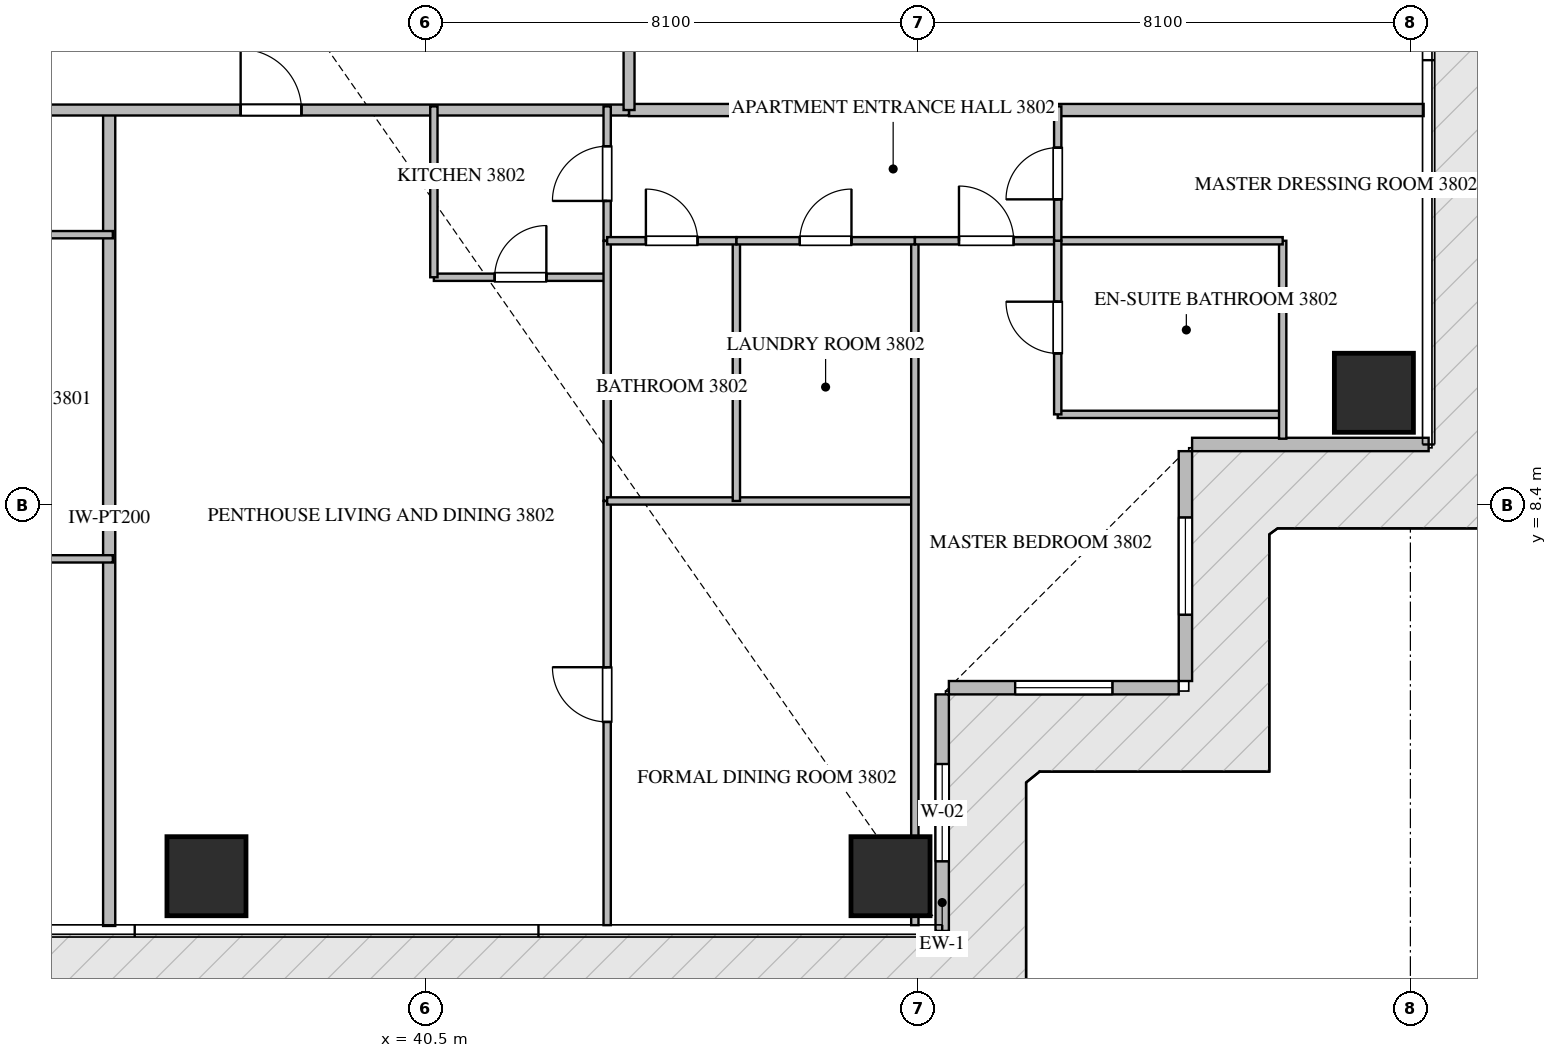
"""IFC4 building model, lengths in metres.
Left out: names, types, materials, properties, quantities, classifications, styles, units other than length and angle.
Written with IfcOpenShell. Run it as: python <this file> out.ifc"""

import sys

from ifc_helpers import new_model, si_unit, direction, frame, frame_2d, origin, origin_2d, place, context, subcontext, project, spatial, rectangle, extrude, source, transform, mapped, element, fill, save


model = new_model("IFC4")
c1 = context("Model", 3, precision=1e-05, world=origin(), true_north=direction((0.0, 1.0)))
c2 = subcontext(c1, "Body", "Model", "MODEL_VIEW")
j1 = project(units=[si_unit("LENGTHUNIT", "METRE"), si_unit("PLANEANGLEUNIT", "RADIAN")], contexts=[c1])
p1 = place(None, origin())
s1 = spatial("IfcSite", under=j1, at=p1, CompositionType="ELEMENT")
p2 = place(p1, origin())
s2 = spatial("IfcBuilding", under=s1, at=p2, CompositionType="ELEMENT")
p3 = place(p2, frame((0.0, 0.0, 153.9)))
s3 = spatial("IfcBuildingStorey", under=s2, at=p3, CompositionType="ELEMENT", Elevation=153.9)
m1 = source(origin(), c2, "Body", "SweptSolid", [
    extrude(rectangle(XDim=1.3, YDim=1.3, at=origin_2d()), origin(), (0.0, 0.0, 1.0), 3.75),
])
for number, where, z_axis, x_axis in (
    (1, (36.9, 2.3, -0.26), (0.0, 0.0, 1.0), (1.0, 0.0, 0.0)),
    (2, (48.15, 2.3, -0.26), (0.0, 0.0, 1.0), (1.0, 0.0, 0.0)),
    (3, (56.1, 10.25, -0.26), (0.0, 0.0, 1.0), (1.0, 0.0, 0.0)),
):
    element("IfcColumn", number, at=place(p3, frame(where, z_axis=z_axis, x_axis=x_axis)), inside=s3, PredefinedType="COLUMN", context=c2, shape_type="MappedRepresentation", body=[
        mapped(m1, transform((0.0, 0.0, 0.0), scale=1.0)),
    ])
p4 = place(p3, frame((49.0, 1.4, 0.0), z_axis=(0.0, 0.0, 1.0), x_axis=(0.0, 1.0, 0.0)))
e4 = element("IfcWall", 4, at=p4, inside=s3, PredefinedType="ELEMENTEDWALL", context=c2, shape_type="SweptSolid", body=[
    extrude(rectangle(XDim=3.89, YDim=0.22, at=frame_2d((1.945, 0.0))), origin(), (0.0, 0.0, 1.0), 3.475),
])
p5 = place(p4, frame((1.145, 0.0, 0.65)))
e5 = element("IfcOpeningElement", 5, at=p5, cuts=e4, PredefinedType="OPENING", context=c2, shape_type="SweptSolid", body=[
    extrude(rectangle(XDim=1.6, YDim=2.1, at=frame_2d((0.8, 1.05))), frame((0.0, 0.12, 0.0), z_axis=(0.0, -1.0, 0.0), x_axis=(1.0, 0.0, 0.0)), (0.0, 0.0, 1.0), 0.24),
])
p6 = place(p3, frame((49.11, 5.4, 0.0), z_axis=(0.0, 0.0, 1.0), x_axis=(1.0, 0.0, 0.0)))
e6 = element("IfcWall", 6, at=p6, inside=s3, PredefinedType="ELEMENTEDWALL", context=c2, shape_type="SweptSolid", body=[
    extrude(rectangle(XDim=3.78, YDim=0.22, at=frame_2d((1.89, 0.0))), origin(), (0.0, 0.0, 1.0), 3.475),
])
p7 = place(p6, frame((1.09, 0.0, 0.65)))
e7 = element("IfcOpeningElement", 7, at=p7, cuts=e6, PredefinedType="OPENING", context=c2, shape_type="SweptSolid", body=[
    extrude(rectangle(XDim=1.6, YDim=2.1, at=frame_2d((0.8, 1.05))), frame((0.0, 0.12, 0.0), z_axis=(0.0, -1.0, 0.0), x_axis=(1.0, 0.0, 0.0)), (0.0, 0.0, 1.0), 0.24),
])
p8 = place(p3, frame((53.0, 5.51, 0.0), z_axis=(0.0, 0.0, 1.0), x_axis=(0.0, 1.0, 0.0)))
e8 = element("IfcWall", 8, at=p8, inside=s3, PredefinedType="ELEMENTEDWALL", context=c2, shape_type="SweptSolid", body=[
    extrude(rectangle(XDim=3.78, YDim=0.22, at=frame_2d((1.89, 0.0))), origin(), (0.0, 0.0, 1.0), 3.475),
])
p9 = place(p8, frame((1.09, 0.0, 0.65)))
e9 = element("IfcOpeningElement", 9, at=p9, cuts=e8, PredefinedType="OPENING", context=c2, shape_type="SweptSolid", body=[
    extrude(rectangle(XDim=1.6, YDim=2.1, at=frame_2d((0.8, 1.05))), frame((0.0, 0.12, 0.0), z_axis=(0.0, -1.0, 0.0), x_axis=(1.0, 0.0, 0.0)), (0.0, 0.0, 1.0), 0.24),
])
p10 = place(p3, frame((53.11, 9.4, 0.0), z_axis=(0.0, 0.0, 1.0), x_axis=(1.0, 0.0, 0.0)))
e10 = element("IfcWall", 10, at=p10, inside=s3, PredefinedType="ELEMENTEDWALL", context=c2, shape_type="SweptSolid", body=[
    extrude(rectangle(XDim=3.89, YDim=0.22, at=frame_2d((1.945, 0.0))), origin(), (0.0, 0.0, 1.0), 3.475),
])
p11 = place(p3, frame((35.3, 1.482, 0.0), z_axis=(0.0, 0.0, 1.0), x_axis=(0.0, 1.0, 0.0)))
e11 = element("IfcWall", 11, at=p11, inside=s3, PredefinedType="PARTITIONING", context=c2, shape_type="SweptSolid", body=[
    extrude(rectangle(XDim=13.418, YDim=0.2, at=frame_2d((6.709, 0.0))), origin(), (0.0, 0.0, 1.0), 3.49),
])
p12 = place(p3, frame((43.85, 14.9, 0.0), z_axis=(0.0, 0.0, 1.0), x_axis=(1.0, 0.0, 0.0)))
e12 = element("IfcWall", 12, at=p12, inside=s3, PredefinedType="PARTITIONING", context=c2, shape_type="SweptSolid", body=[
    extrude(rectangle(XDim=13.068, YDim=0.2, at=frame_2d((6.534, 0.0))), origin(), (0.0, 0.0, 1.0), 3.49),
])
p13 = place(p3, frame((20.952, 14.9, 0.0), z_axis=(0.0, 0.0, 1.0), x_axis=(1.0, 0.0, 0.0)))
e13 = element("IfcWall", 13, at=p13, inside=s3, PredefinedType="PARTITIONING", context=c2, shape_type="SweptSolid", body=[
    extrude(rectangle(XDim=22.896, YDim=0.18, at=frame_2d((11.448, 0.0))), origin(), (0.0, 0.0, 1.0), 3.49),
])
p14 = place(p13, frame((5.934, 0.0, 0.0)))
e14 = element("IfcOpeningElement", 14, at=p14, cuts=e13, PredefinedType="OPENING", context=c2, shape_type="SweptSolid", body=[
    extrude(rectangle(XDim=1.0, YDim=2.15, at=frame_2d((0.5, 1.075))), frame((0.0, 0.1, 0.0), z_axis=(0.0, -1.0, 0.0), x_axis=(1.0, 0.0, 0.0)), (0.0, 0.0, 1.0), 0.2),
])
p15 = place(p13, frame((16.51, 0.0, 0.0)))
e15 = element("IfcOpeningElement", 15, at=p15, cuts=e13, PredefinedType="OPENING", context=c2, shape_type="SweptSolid", body=[
    extrude(rectangle(XDim=1.0, YDim=2.15, at=frame_2d((0.5, 1.075))), frame((0.0, 0.1, 0.0), z_axis=(0.0, -1.0, 0.0), x_axis=(1.0, 0.0, 0.0)), (0.0, 0.0, 1.0), 0.2),
])
p16 = place(p3, frame((43.85, 14.9, 0.0), z_axis=(0.0, 0.0, 1.0), x_axis=(0.0, 1.0, 0.0)))
e16 = element("IfcWall", 16, at=p16, inside=s3, PredefinedType="PARTITIONING", context=c2, shape_type="SweptSolid", body=[
    extrude(rectangle(XDim=18.7, YDim=0.18, at=frame_2d((9.35, 0.0))), origin(), (0.0, 0.0, 1.0), 3.49),
])
p17 = place(p16, frame((1.805, 0.0, 0.0)))
e17 = element("IfcOpeningElement", 17, at=p17, cuts=e16, PredefinedType="OPENING", context=c2, shape_type="SweptSolid", body=[
    extrude(rectangle(XDim=1.0, YDim=2.15, at=frame_2d((0.5, 1.075))), frame((0.0, 0.1, 0.0), z_axis=(0.0, -1.0, 0.0), x_axis=(1.0, 0.0, 0.0)), (0.0, 0.0, 1.0), 0.2),
])
for number, where, z_axis, x_axis in (
    (18, (30.27, 7.519, 0.0), (0.0, 0.0, 1.0), (1.0, 0.0, 0.0)),
    (19, (30.27, 12.85, 0.0), (0.0, 0.0, 1.0), (1.0, 0.0, 0.0)),
):
    element("IfcWall", number, at=place(p3, frame(where, z_axis=z_axis, x_axis=x_axis)), inside=s3, PredefinedType="PARTITIONING", context=c2, shape_type="SweptSolid", body=[
        extrude(rectangle(XDim=5.09, YDim=0.12, at=frame_2d((2.545, 0.0))), origin(), (0.0, 0.0, 1.0), 3.49),
    ])
p18 = place(p3, frame((40.64, 12.15, 0.0), z_axis=(0.0, 0.0, 1.0), x_axis=(1.0, 0.0, 0.0)))
e20 = element("IfcWall", 20, at=p18, inside=s3, PredefinedType="PARTITIONING", context=c2, shape_type="SweptSolid", body=[
    extrude(rectangle(XDim=2.85, YDim=0.12, at=frame_2d((1.425, 0.0))), origin(), (0.0, 0.0, 1.0), 3.49),
])
p19 = place(p18, frame((1.0, 0.0, 0.0)))
e21 = element("IfcOpeningElement", 21, at=p19, cuts=e20, PredefinedType="OPENING", context=c2, shape_type="SweptSolid", body=[
    extrude(rectangle(XDim=0.85, YDim=2.1, at=frame_2d((0.425, 1.05))), frame((0.0, 0.07, 0.0), z_axis=(0.0, -1.0, 0.0), x_axis=(1.0, 0.0, 0.0)), (0.0, 0.0, 1.0), 0.14),
])
p20 = place(p3, frame((40.64, 12.15, 0.0), z_axis=(0.0, 0.0, 1.0), x_axis=(0.0, 1.0, 0.0)))
e22 = element("IfcWall", 22, at=p20, inside=s3, PredefinedType="PARTITIONING", context=c2, shape_type="SweptSolid", body=[
    extrude(rectangle(XDim=2.81, YDim=0.12, at=frame_2d((1.405, 0.0))), origin(), (0.0, 0.0, 1.0), 3.49),
])
p21 = place(p3, frame((43.49, 12.75, 0.0), z_axis=(0.0, 0.0, 1.0), x_axis=(0.0, 1.0, 0.0)))
e23 = element("IfcWall", 23, at=p21, inside=s3, PredefinedType="PARTITIONING", context=c2, shape_type="SweptSolid", body=[
    extrude(rectangle(XDim=2.21, YDim=0.12, at=frame_2d((1.105, 0.0))), origin(), (0.0, 0.0, 1.0), 3.49),
])
p22 = place(p21, frame((0.655, 0.0, 0.0)))
e24 = element("IfcOpeningElement", 24, at=p22, cuts=e23, PredefinedType="OPENING", context=c2, shape_type="SweptSolid", body=[
    extrude(rectangle(XDim=0.9, YDim=2.1, at=frame_2d((0.45, 1.05))), frame((0.0, 0.07, 0.0), z_axis=(0.0, -1.0, 0.0), x_axis=(1.0, 0.0, 0.0)), (0.0, 0.0, 1.0), 0.14),
])
p23 = place(p3, frame((43.49, 1.495, 0.0), z_axis=(0.0, 0.0, 1.0), x_axis=(0.0, 1.0, 0.0)))
e25 = element("IfcWall", 25, at=p23, inside=s3, PredefinedType="PARTITIONING", context=c2, shape_type="SweptSolid", body=[
    extrude(rectangle(XDim=6.976, YDim=0.12, at=frame_2d((3.488, 0.0))), origin(), (0.0, 0.0, 1.0), 3.49),
])
p24 = place(p23, frame((3.342, 0.0, 0.0)))
e26 = element("IfcOpeningElement", 26, at=p24, cuts=e25, PredefinedType="OPENING", context=c2, shape_type="SweptSolid", body=[
    extrude(rectangle(XDim=0.9, YDim=2.1, at=frame_2d((0.45, 1.05))), frame((0.0, 0.07, 0.0), z_axis=(0.0, -1.0, 0.0), x_axis=(1.0, 0.0, 0.0)), (0.0, 0.0, 1.0), 0.14),
])
p25 = place(p3, frame((43.49, 8.473, 0.0), z_axis=(0.0, 0.0, 1.0), x_axis=(0.0, 1.0, 0.0)))
e27 = element("IfcWall", 27, at=p25, inside=s3, PredefinedType="PARTITIONING", context=c2, shape_type="SweptSolid", body=[
    extrude(rectangle(XDim=4.275, YDim=0.12, at=frame_2d((2.138, 0.0))), origin(), (0.0, 0.0, 1.0), 3.49),
])
p26 = place(p3, frame((43.49, 8.471, 0.0), z_axis=(0.0, 0.0, 1.0), x_axis=(1.0, 0.0, 0.0)))
e28 = element("IfcWall", 28, at=p26, inside=s3, PredefinedType="PARTITIONING", context=c2, shape_type="SweptSolid", body=[
    extrude(rectangle(XDim=5.06, YDim=0.12, at=frame_2d((2.53, 0.0))), origin(), (0.0, 0.0, 1.0), 3.49),
])
p27 = place(p3, frame((48.55, 1.495, 0.0), z_axis=(0.0, 0.0, 1.0), x_axis=(0.0, 1.0, 0.0)))
e29 = element("IfcWall", 29, at=p27, inside=s3, PredefinedType="PARTITIONING", context=c2, shape_type="SweptSolid", body=[
    extrude(rectangle(XDim=11.255, YDim=0.12, at=frame_2d((5.627, 0.0))), origin(), (0.0, 0.0, 1.0), 3.49),
])
p28 = place(p3, frame((45.615, 8.471, 0.0), z_axis=(0.0, 0.0, 1.0), x_axis=(0.0, 1.0, 0.0)))
e30 = element("IfcWall", 30, at=p28, inside=s3, PredefinedType="PARTITIONING", context=c2, shape_type="SweptSolid", body=[
    extrude(rectangle(XDim=4.279, YDim=0.12, at=frame_2d((2.14, 0.0))), origin(), (0.0, 0.0, 1.0), 3.49),
])
p29 = place(p3, frame((43.49, 12.75, 0.0), z_axis=(0.0, 0.0, 1.0), x_axis=(1.0, 0.0, 0.0)))
e31 = element("IfcWall", 31, at=p29, inside=s3, PredefinedType="PARTITIONING", context=c2, shape_type="SweptSolid", body=[
    extrude(rectangle(XDim=2.125, YDim=0.12, at=frame_2d((1.062, 0.0))), origin(), (0.0, 0.0, 1.0), 3.49),
])
p30 = place(p29, frame((0.637, 0.0, 0.0)))
e32 = element("IfcOpeningElement", 32, at=p30, cuts=e31, PredefinedType="OPENING", context=c2, shape_type="SweptSolid", body=[
    extrude(rectangle(XDim=0.85, YDim=2.1, at=frame_2d((0.425, 1.05))), frame((0.0, 0.07, 0.0), z_axis=(0.0, -1.0, 0.0), x_axis=(1.0, 0.0, 0.0)), (0.0, 0.0, 1.0), 0.14),
])
p31 = place(p3, frame((45.617, 12.75, 0.0), z_axis=(0.0, 0.0, 1.0), x_axis=(1.0, 0.0, 0.0)))
e33 = element("IfcWall", 33, at=p31, inside=s3, PredefinedType="PARTITIONING", context=c2, shape_type="SweptSolid", body=[
    extrude(rectangle(XDim=2.933, YDim=0.12, at=frame_2d((1.467, 0.0))), origin(), (0.0, 0.0, 1.0), 3.49),
])
p32 = place(p31, frame((1.041, 0.0, 0.0)))
e34 = element("IfcOpeningElement", 34, at=p32, cuts=e33, PredefinedType="OPENING", context=c2, shape_type="SweptSolid", body=[
    extrude(rectangle(XDim=0.85, YDim=2.1, at=frame_2d((0.425, 1.05))), frame((0.0, 0.07, 0.0), z_axis=(0.0, -1.0, 0.0), x_axis=(1.0, 0.0, 0.0)), (0.0, 0.0, 1.0), 0.14),
])
p33 = place(p3, frame((48.552, 12.75, 0.0), z_axis=(0.0, 0.0, 1.0), x_axis=(1.0, 0.0, 0.0)))
e35 = element("IfcWall", 35, at=p33, inside=s3, PredefinedType="PARTITIONING", context=c2, shape_type="SweptSolid", body=[
    extrude(rectangle(XDim=2.348, YDim=0.12, at=frame_2d((1.174, 0.0))), origin(), (0.0, 0.0, 1.0), 3.49),
])
p34 = place(p33, frame((0.724, 0.0, 0.0)))
e36 = element("IfcOpeningElement", 36, at=p34, cuts=e35, PredefinedType="OPENING", context=c2, shape_type="SweptSolid", body=[
    extrude(rectangle(XDim=0.9, YDim=2.1, at=frame_2d((0.45, 1.05))), frame((0.0, 0.07, 0.0), z_axis=(0.0, -1.0, 0.0), x_axis=(1.0, 0.0, 0.0)), (0.0, 0.0, 1.0), 0.14),
])
p35 = place(p3, frame((50.9, 9.895, 0.0), z_axis=(0.0, 0.0, 1.0), x_axis=(1.0, 0.0, 0.0)))
e37 = element("IfcWall", 37, at=p35, inside=s3, PredefinedType="PARTITIONING", context=c2, shape_type="SweptSolid", body=[
    extrude(rectangle(XDim=3.7, YDim=0.12, at=frame_2d((1.85, 0.0))), origin(), (0.0, 0.0, 1.0), 3.49),
])
p36 = place(p3, frame((54.6, 9.495, 0.0), z_axis=(0.0, 0.0, 1.0), x_axis=(0.0, 1.0, 0.0)))
e38 = element("IfcWall", 38, at=p36, inside=s3, PredefinedType="PARTITIONING", context=c2, shape_type="SweptSolid", body=[
    extrude(rectangle(XDim=3.255, YDim=0.12, at=frame_2d((1.627, 0.0))), origin(), (0.0, 0.0, 1.0), 3.49),
])
p37 = place(p3, frame((50.902, 12.75, 0.0), z_axis=(0.0, 0.0, 1.0), x_axis=(1.0, 0.0, 0.0)))
e39 = element("IfcWall", 39, at=p37, inside=s3, PredefinedType="PARTITIONING", context=c2, shape_type="SweptSolid", body=[
    extrude(rectangle(XDim=3.698, YDim=0.12, at=frame_2d((1.849, 0.0))), origin(), (0.0, 0.0, 1.0), 3.49),
])
p38 = place(p3, frame((50.9, 9.895, 0.0), z_axis=(0.0, 0.0, 1.0), x_axis=(0.0, 1.0, 0.0)))
e40 = element("IfcWall", 40, at=p38, inside=s3, PredefinedType="PARTITIONING", context=c2, shape_type="SweptSolid", body=[
    extrude(rectangle(XDim=2.855, YDim=0.12, at=frame_2d((1.427, 0.0))), origin(), (0.0, 0.0, 1.0), 3.49),
])
p39 = place(p38, frame((1.003, 0.0, 0.0)))
e41 = element("IfcOpeningElement", 41, at=p39, cuts=e40, PredefinedType="OPENING", context=c2, shape_type="SweptSolid", body=[
    extrude(rectangle(XDim=0.85, YDim=2.1, at=frame_2d((0.425, 1.05))), frame((0.0, 0.07, 0.0), z_axis=(0.0, -1.0, 0.0), x_axis=(1.0, 0.0, 0.0)), (0.0, 0.0, 1.0), 0.14),
])
p40 = place(p3, frame((50.9, 12.752, 0.0), z_axis=(0.0, 0.0, 1.0), x_axis=(0.0, 1.0, 0.0)))
e42 = element("IfcWall", 42, at=p40, inside=s3, PredefinedType="PARTITIONING", context=c2, shape_type="SweptSolid", body=[
    extrude(rectangle(XDim=2.208, YDim=0.12, at=frame_2d((1.104, 0.0))), origin(), (0.0, 0.0, 1.0), 3.49),
])
p41 = place(p40, frame((0.679, 0.0, 0.0)))
e43 = element("IfcOpeningElement", 43, at=p41, cuts=e42, PredefinedType="OPENING", context=c2, shape_type="SweptSolid", body=[
    extrude(rectangle(XDim=0.85, YDim=2.1, at=frame_2d((0.425, 1.05))), frame((0.0, 0.07, 0.0), z_axis=(0.0, -1.0, 0.0), x_axis=(1.0, 0.0, 0.0)), (0.0, 0.0, 1.0), 0.14),
])
m2 = source(origin(), c2, "Body", "SweptSolid", [
    extrude(rectangle(XDim=1.6, YDim=2.1, at=frame_2d((0.8, 1.05))), frame((0.0, 0.03, 0.0), z_axis=(0.0, -1.0, 0.0), x_axis=(1.0, 0.0, 0.0)), (0.0, 0.0, 1.0), 0.06),
])
p42 = place(p5, origin())
e44 = element("IfcWindow", 44, at=p42, inside=s3, PartitioningType="SINGLE_PANEL", PredefinedType="WINDOW", context=c2, shape_type="MappedRepresentation", body=[
    mapped(m2, transform((0.0, 0.0, 0.0), scale=1.0)),
])
fill(e5, e44)
p43 = place(p7, origin())
e45 = element("IfcWindow", 45, at=p43, inside=s3, PartitioningType="SINGLE_PANEL", PredefinedType="WINDOW", context=c2, shape_type="MappedRepresentation", body=[
    mapped(m2, transform((0.0, 0.0, 0.0), scale=1.0)),
])
fill(e7, e45)
p44 = place(p9, origin())
e46 = element("IfcWindow", 46, at=p44, inside=s3, PartitioningType="SINGLE_PANEL", PredefinedType="WINDOW", context=c2, shape_type="MappedRepresentation", body=[
    mapped(m2, transform((0.0, 0.0, 0.0), scale=1.0)),
])
fill(e9, e46)
m3 = source(origin(), c2, "Body", "SweptSolid", [
    extrude(rectangle(XDim=1.0, YDim=2.15, at=frame_2d((0.5, 1.075))), frame((0.0, 0.025, 0.0), z_axis=(0.0, -1.0, 0.0), x_axis=(1.0, 0.0, 0.0)), (0.0, 0.0, 1.0), 0.05),
])
p45 = place(p15, origin())
e47 = element("IfcDoor", 47, at=p45, inside=s3, OperationType="SINGLE_SWING_LEFT", PredefinedType="DOOR", context=c2, shape_type="MappedRepresentation", body=[
    mapped(m3, transform((0.0, 0.0, 0.0), scale=1.0)),
])
fill(e15, e47)
m4 = source(origin(), c2, "Body", "SweptSolid", [
    extrude(rectangle(XDim=0.85, YDim=2.1, at=frame_2d((0.425, 1.05))), frame((0.0, 0.025, 0.0), z_axis=(0.0, -1.0, 0.0), x_axis=(1.0, 0.0, 0.0)), (0.0, 0.0, 1.0), 0.05),
])
p46 = place(p19, origin())
e48 = element("IfcDoor", 48, at=p46, inside=s3, OperationType="SINGLE_SWING_RIGHT", PredefinedType="DOOR", context=c2, shape_type="MappedRepresentation", body=[
    mapped(m4, transform((0.0, 0.0, 0.0), scale=1.0)),
])
fill(e21, e48)
m5 = source(origin(), c2, "Body", "SweptSolid", [
    extrude(rectangle(XDim=0.9, YDim=2.1, at=frame_2d((0.45, 1.05))), frame((0.0, 0.025, 0.0), z_axis=(0.0, -1.0, 0.0), x_axis=(1.0, 0.0, 0.0)), (0.0, 0.0, 1.0), 0.05),
])
p47 = place(p22, origin())
e49 = element("IfcDoor", 49, at=p47, inside=s3, OperationType="SINGLE_SWING_LEFT", PredefinedType="DOOR", context=c2, shape_type="MappedRepresentation", body=[
    mapped(m5, transform((0.0, 0.0, 0.0), scale=1.0)),
])
fill(e24, e49)
p48 = place(p24, origin())
e50 = element("IfcDoor", 50, at=p48, inside=s3, OperationType="SINGLE_SWING_RIGHT", PredefinedType="DOOR", context=c2, shape_type="MappedRepresentation", body=[
    mapped(m5, transform((0.0, 0.0, 0.0), scale=1.0)),
])
fill(e26, e50)
p49 = place(p30, origin())
e51 = element("IfcDoor", 51, at=p49, inside=s3, OperationType="SINGLE_SWING_LEFT", PredefinedType="DOOR", context=c2, shape_type="MappedRepresentation", body=[
    mapped(m4, transform((0.0, 0.0, 0.0), scale=1.0)),
])
fill(e32, e51)
p50 = place(p32, origin())
e52 = element("IfcDoor", 52, at=p50, inside=s3, OperationType="SINGLE_SWING_RIGHT", PredefinedType="DOOR", context=c2, shape_type="MappedRepresentation", body=[
    mapped(m4, transform((0.0, 0.0, 0.0), scale=1.0)),
])
fill(e34, e52)
p51 = place(p34, origin())
e53 = element("IfcDoor", 53, at=p51, inside=s3, OperationType="SINGLE_SWING_LEFT", PredefinedType="DOOR", context=c2, shape_type="MappedRepresentation", body=[
    mapped(m5, transform((0.0, 0.0, 0.0), scale=1.0)),
])
fill(e36, e53)
p52 = place(p39, origin())
e54 = element("IfcDoor", 54, at=p52, inside=s3, OperationType="SINGLE_SWING_RIGHT", PredefinedType="DOOR", context=c2, shape_type="MappedRepresentation", body=[
    mapped(m4, transform((0.0, 0.0, 0.0), scale=1.0)),
])
fill(e41, e54)
p53 = place(p41, origin())
e55 = element("IfcDoor", 55, at=p53, inside=s3, OperationType="SINGLE_SWING_LEFT", PredefinedType="DOOR", context=c2, shape_type="MappedRepresentation", body=[
    mapped(m4, transform((0.0, 0.0, 0.0), scale=1.0)),
])
fill(e43, e55)
save(model, sys.argv[1])
